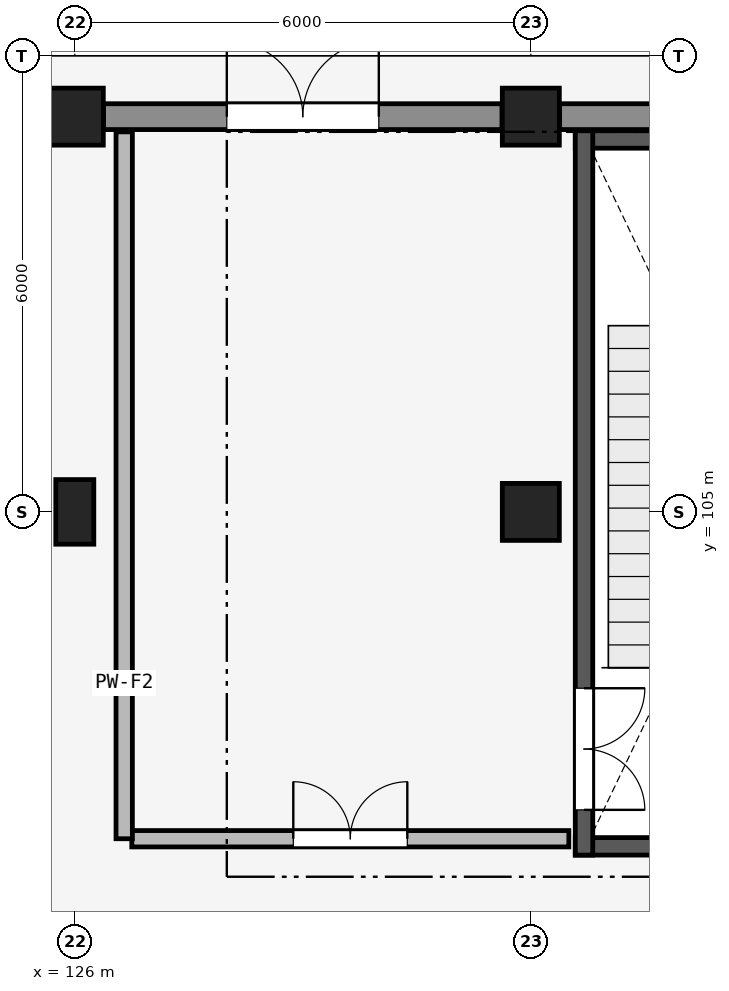
"""IFC4 building model, lengths in metres.
Left out: names, types, materials, properties, quantities, classifications, styles, units other than length and angle.
Written with IfcOpenShell. Run it as: python <this file> out.ifc"""

import sys

from ifc_helpers import new_model, si_unit, direction, frame, frame_2d, origin, origin_2d, place, context, subcontext, project, spatial, rectangle, extrude, element, fill, save


model = new_model("IFC4")
c1 = context("Model", 3, precision=1e-05, world=origin(), true_north=direction((0.0, 1.0)))
c2 = subcontext(c1, "Body", "Model", "MODEL_VIEW")
j1 = project(units=[si_unit("LENGTHUNIT", "METRE"), si_unit("PLANEANGLEUNIT", "RADIAN")], contexts=[c1])
p1 = place(None, origin())
s1 = spatial("IfcSite", under=j1, at=p1, CompositionType="ELEMENT")
p2 = place(p1, origin())
s2 = spatial("IfcBuilding", under=s1, at=p2, CompositionType="ELEMENT")
p3 = place(p2, origin())
s3 = spatial("IfcBuildingStorey", under=s2, at=p3, CompositionType="ELEMENT", Elevation=0.0)
p4 = place(p3, frame((126.0, 105.0, 0.0), z_axis=(0.0, 0.0, 1.0), x_axis=(1.0, 0.0, 0.0)))
e1 = element("IfcColumn", 1, at=p4, inside=s3, PredefinedType="COLUMN", context=c2, shape_type="SweptSolid", body=[
    extrude(rectangle(XDim=0.5, YDim=0.85, at=origin_2d()), origin(), (0.0, 0.0, 1.0), 4.8),
])
for number, where, z_axis, x_axis in (
    (2, (126.0, 110.2, 0.0), (0.0, 0.0, 1.0), (1.0, 0.0, 0.0)),
    (3, (132.0, 105.0, 0.0), (0.0, 0.0, 1.0), (1.0, 0.0, 0.0)),
    (4, (132.0, 110.2, 0.0), (0.0, 0.0, 1.0), (1.0, 0.0, 0.0)),
):
    element("IfcColumn", number, at=place(p3, frame(where, z_axis=z_axis, x_axis=x_axis)), inside=s3, PredefinedType="COLUMN", context=c2, shape_type="SweptSolid", body=[
        extrude(rectangle(XDim=0.75, YDim=0.75, at=origin_2d()), origin(), (0.0, 0.0, 1.0), 4.8),
    ])
p5 = place(p3, frame((126.379, 110.2, 0.0), z_axis=(0.0, 0.0, 1.0), x_axis=(1.0, 0.0, 0.0)))
e5 = element("IfcWall", 5, at=p5, inside=s3, PredefinedType="SOLIDWALL", context=c2, shape_type="SweptSolid", body=[
    extrude(rectangle(XDim=5.242, YDim=0.34, at=frame_2d((2.621, 0.0))), origin(), (0.0, 0.0, 1.0), 4.083),
])
p6 = place(p5, frame((1.621, 0.0, 0.0)))
e6 = element("IfcOpeningElement", 6, at=p6, cuts=e5, PredefinedType="OPENING", context=c2, shape_type="SweptSolid", body=[
    extrude(rectangle(XDim=2.0, YDim=2.4, at=frame_2d((1.0, 1.2))), frame((0.0, 0.18, 0.0), z_axis=(0.0, -1.0, 0.0), x_axis=(1.0, 0.0, 0.0)), (0.0, 0.0, 1.0), 0.36),
])
p7 = place(p3, frame((132.379, 110.2, 0.0), z_axis=(0.0, 0.0, 1.0), x_axis=(1.0, 0.0, 0.0)))
e7 = element("IfcWall", 7, at=p7, inside=s3, PredefinedType="SOLIDWALL", context=c2, shape_type="SweptSolid", body=[
    extrude(rectangle(XDim=5.367, YDim=0.34, at=frame_2d((2.684, 0.0))), origin(), (0.0, 0.0, 1.0), 4.083),
])
for number, where, z_axis, x_axis in (
    (8, (132.585, 100.6, 0.0), (0.0, 0.0, 1.0), (1.0, 0.0, 0.0)),
    (9, (137.315, 109.9, 0.0), (0.0, 0.0, 1.0), (-1.0, 0.0, 0.0)),
):
    element("IfcWall", number, at=place(p3, frame(where, z_axis=z_axis, x_axis=x_axis)), inside=s3, PredefinedType="SHEAR", context=c2, shape_type="SweptSolid", body=[
        extrude(rectangle(XDim=4.73, YDim=0.23, at=frame_2d((2.365, 0.0))), origin(), (0.0, 0.0, 1.0), 4.66),
    ])
p8 = place(p3, frame((132.7, 110.015, 0.0), z_axis=(0.0, 0.0, 1.0), x_axis=(0.0, -1.0, 0.0)))
e10 = element("IfcWall", 10, at=p8, inside=s3, PredefinedType="SHEAR", context=c2, shape_type="SweptSolid", body=[
    extrude(rectangle(XDim=9.53, YDim=0.23, at=frame_2d((4.765, 0.0))), origin(), (0.0, 0.0, 1.0), 4.66),
])
p9 = place(p8, frame((7.335, 0.0, 0.0)))
e11 = element("IfcOpeningElement", 11, at=p9, cuts=e10, PredefinedType="OPENING", context=c2, shape_type="SweptSolid", body=[
    extrude(rectangle(XDim=1.6, YDim=2.2, at=frame_2d((0.8, 1.1))), frame((0.0, 0.125, 0.0), z_axis=(0.0, -1.0, 0.0), x_axis=(1.0, 0.0, 0.0)), (0.0, 0.0, 1.0), 0.25),
])
p10 = place(p3, frame((126.75, 100.7, 0.0), z_axis=(0.0, 0.0, 1.0), x_axis=(1.0, 0.0, 0.0)))
e12 = element("IfcWall", 12, at=p10, inside=s3, PredefinedType="PARTITIONING", context=c2, shape_type="SweptSolid", body=[
    extrude(rectangle(XDim=5.75, YDim=0.215, at=frame_2d((2.875, 0.0))), origin(), (0.0, 0.0, 1.0), 4.09),
])
p11 = place(p10, frame((2.125, 0.0, 0.0)))
e13 = element("IfcOpeningElement", 13, at=p11, cuts=e12, PredefinedType="OPENING", context=c2, shape_type="SweptSolid", body=[
    extrude(rectangle(XDim=1.5, YDim=2.15, at=frame_2d((0.75, 1.075))), frame((0.0, 0.117, 0.0), z_axis=(0.0, -1.0, 0.0), x_axis=(1.0, 0.0, 0.0)), (0.0, 0.0, 1.0), 0.235),
])
p12 = place(p3, frame((126.65, 100.7, 0.0), z_axis=(0.0, 0.0, 1.0), x_axis=(0.0, 1.0, 0.0)))
e14 = element("IfcWall", 14, at=p12, inside=s3, PredefinedType="PARTITIONING", context=c2, shape_type="SweptSolid", body=[
    extrude(rectangle(XDim=9.3, YDim=0.215, at=frame_2d((4.65, 0.0))), origin(), (0.0, 0.0, 1.0), 4.04),
])
p13 = place(p6, origin())
e15 = element("IfcDoor", 15, at=p13, inside=s3, OperationType="DOUBLE_DOOR_SINGLE_SWING", PredefinedType="DOOR", context=c2, shape_type="SweptSolid", body=[
    extrude(rectangle(XDim=2.0, YDim=2.4, at=frame_2d((1.0, 1.2))), frame((0.0, 0.025, 0.0), z_axis=(0.0, -1.0, 0.0), x_axis=(1.0, 0.0, 0.0)), (0.0, 0.0, 1.0), 0.05),
])
fill(e6, e15)
p14 = place(p9, origin())
e16 = element("IfcDoor", 16, at=p14, inside=s3, OperationType="DOUBLE_DOOR_SINGLE_SWING", PredefinedType="DOOR", context=c2, shape_type="SweptSolid", body=[
    extrude(rectangle(XDim=1.6, YDim=2.2, at=frame_2d((0.8, 1.1))), frame((0.0, 0.025, 0.0), z_axis=(0.0, -1.0, 0.0), x_axis=(1.0, 0.0, 0.0)), (0.0, 0.0, 1.0), 0.05),
])
fill(e11, e16)
p15 = place(p11, origin())
e17 = element("IfcDoor", 17, at=p15, inside=s3, OperationType="DOUBLE_DOOR_SINGLE_SWING", PredefinedType="DOOR", context=c2, shape_type="SweptSolid", body=[
    extrude(rectangle(XDim=1.5, YDim=2.15, at=frame_2d((0.75, 1.075))), frame((0.0, 0.025, 0.0), z_axis=(0.0, -1.0, 0.0), x_axis=(1.0, 0.0, 0.0)), (0.0, 0.0, 1.0), 0.05),
])
fill(e13, e17)
save(model, sys.argv[1])
